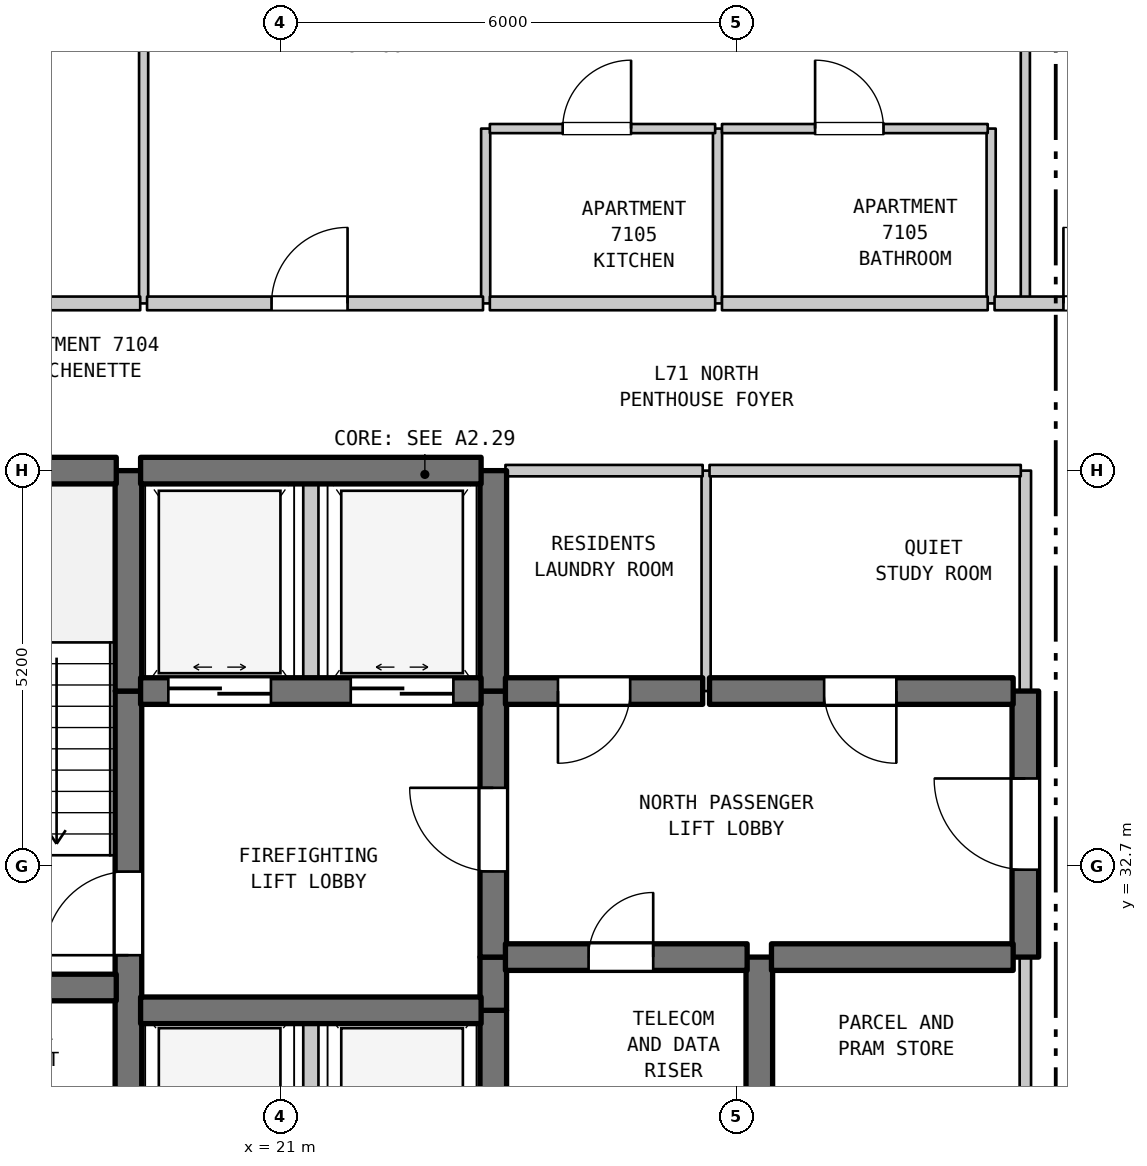
"""IFC4 building model, lengths in metres.
Left out: names, types, materials, properties, quantities, classifications, styles, units other than length and angle.
Written with IfcOpenShell. Run it as: python <this file> out.ifc"""

import sys

from ifc_helpers import new_model, si_unit, direction, frame, frame_2d, origin, place, context, subcontext, project, spatial, rectangle, extrude, element, fill, save


model = new_model("IFC4")
c1 = context("Model", 3, precision=1e-05, world=origin(), true_north=direction((0.0, 1.0)))
c2 = subcontext(c1, "Body", "Model", "MODEL_VIEW")
j1 = project(units=[si_unit("LENGTHUNIT", "METRE"), si_unit("PLANEANGLEUNIT", "RADIAN")], contexts=[c1])
p1 = place(None, origin())
s1 = spatial("IfcSite", under=j1, at=p1, CompositionType="ELEMENT")
p2 = place(p1, origin())
s2 = spatial("IfcBuilding", under=s1, at=p2, CompositionType="ELEMENT")
p3 = place(p2, frame((0.0, 0.0, 284.3)))
s3 = spatial("IfcBuildingStorey", under=s2, at=p3, CompositionType="ELEMENT", Elevation=284.3)
p4 = place(p3, frame((19.0, 29.5, 0.0), z_axis=(0.0, 0.0, 1.0), x_axis=(0.0, 1.0, 0.0)))
e1 = element("IfcWall", 1, at=p4, inside=s3, PredefinedType="SHEAR", context=c2, shape_type="SweptSolid", body=[
    extrude(rectangle(XDim=5.5, YDim=0.35, at=frame_2d((2.75, 0.0))), origin(), (0.0, 0.0, 1.0), 3.39),
])
p5 = place(p4, frame((2.025, 0.0, 0.0)))
e2 = element("IfcOpeningElement", 2, at=p5, cuts=e1, PredefinedType="OPENING", context=c2, shape_type="SweptSolid", body=[
    extrude(rectangle(XDim=1.1, YDim=2.15, at=frame_2d((0.55, 1.075))), frame((0.0, 0.185, 0.0), z_axis=(0.0, -1.0, 0.0), x_axis=(1.0, 0.0, 0.0)), (0.0, 0.0, 1.0), 0.37),
])
p6 = place(p3, frame((19.0, 35.0, 0.0), z_axis=(0.0, 0.0, 1.0), x_axis=(0.0, 1.0, 0.0)))
e3 = element("IfcWall", 3, at=p6, inside=s3, PredefinedType="SHEAR", context=c2, shape_type="SweptSolid", body=[
    extrude(rectangle(XDim=2.9, YDim=0.35, at=frame_2d((1.45, 0.0))), origin(), (0.0, 0.0, 1.0), 3.39),
])
p7 = place(p3, frame((19.2, 40.1, 0.0), z_axis=(0.0, 0.0, 1.0), x_axis=(0.0, 1.0, 0.0)))
e4 = element("IfcWall", 4, at=p7, inside=s3, PredefinedType="PARTITIONING", context=c2, shape_type="SweptSolid", body=[
    extrude(rectangle(XDim=13.79, YDim=0.12, at=frame_2d((6.895, 0.0))), origin(), (0.0, 0.0, 1.0), 3.39),
])
p8 = place(p3, frame((21.4, 28.2, 0.0), z_axis=(0.0, 0.0, 1.0), x_axis=(0.0, 1.0, 0.0)))
e5 = element("IfcWall", 5, at=p8, inside=s3, PredefinedType="STANDARD", context=c2, shape_type="SweptSolid", body=[
    extrude(rectangle(XDim=2.6, YDim=0.2, at=frame_2d((1.3, 0.0))), origin(), (0.0, 0.0, 1.0), 3.39),
])
p9 = place(p3, frame((21.4, 35.0, 0.0), z_axis=(0.0, 0.0, 1.0), x_axis=(0.0, 1.0, 0.0)))
e6 = element("IfcWall", 6, at=p9, inside=s3, PredefinedType="STANDARD", context=c2, shape_type="SweptSolid", body=[
    extrude(rectangle(XDim=2.9, YDim=0.2, at=frame_2d((1.45, 0.0))), origin(), (0.0, 0.0, 1.0), 3.39),
])
p10 = place(p3, frame((23.7, 40.1, 0.0), z_axis=(0.0, 0.0, 1.0), x_axis=(0.0, 1.0, 0.0)))
e7 = element("IfcWall", 7, at=p10, inside=s3, PredefinedType="PARTITIONING", context=c2, shape_type="SweptSolid", body=[
    extrude(rectangle(XDim=2.3, YDim=0.12, at=frame_2d((1.15, 0.0))), origin(), (0.0, 0.0, 1.0), 3.39),
])
p11 = place(p3, frame((23.8, 28.2, 0.0), z_axis=(0.0, 0.0, 1.0), x_axis=(0.0, 1.0, 0.0)))
e8 = element("IfcWall", 8, at=p11, inside=s3, PredefinedType="SHEAR", context=c2, shape_type="SweptSolid", body=[
    extrude(rectangle(XDim=2.6, YDim=0.35, at=frame_2d((1.3, 0.0))), origin(), (0.0, 0.0, 1.0), 3.39),
])
p12 = place(p3, frame((23.8, 30.8, 0.0), z_axis=(0.0, 0.0, 1.0), x_axis=(0.0, 1.0, 0.0)))
e9 = element("IfcWall", 9, at=p12, inside=s3, PredefinedType="SHEAR", context=c2, shape_type="SweptSolid", body=[
    extrude(rectangle(XDim=0.7, YDim=0.35, at=frame_2d((0.35, 0.0))), origin(), (0.0, 0.0, 1.0), 3.39),
])
p13 = place(p3, frame((23.8, 31.5, 0.0), z_axis=(0.0, 0.0, 1.0), x_axis=(0.0, 1.0, 0.0)))
e10 = element("IfcWall", 10, at=p13, inside=s3, PredefinedType="SHEAR", context=c2, shape_type="SweptSolid", body=[
    extrude(rectangle(XDim=3.5, YDim=0.35, at=frame_2d((1.75, 0.0))), origin(), (0.0, 0.0, 1.0), 3.39),
])
p14 = place(p13, frame((1.127, 0.0, 0.0)))
e11 = element("IfcOpeningElement", 11, at=p14, cuts=e10, PredefinedType="OPENING", context=c2, shape_type="SweptSolid", body=[
    extrude(rectangle(XDim=1.1, YDim=2.15, at=frame_2d((0.55, 1.075))), frame((0.0, 0.185, 0.0), z_axis=(0.0, -1.0, 0.0), x_axis=(1.0, 0.0, 0.0)), (0.0, 0.0, 1.0), 0.37),
])
p15 = place(p3, frame((23.8, 35.0, 0.0), z_axis=(0.0, 0.0, 1.0), x_axis=(0.0, 1.0, 0.0)))
e12 = element("IfcWall", 12, at=p15, inside=s3, PredefinedType="SHEAR", context=c2, shape_type="SweptSolid", body=[
    extrude(rectangle(XDim=2.9, YDim=0.35, at=frame_2d((1.45, 0.0))), origin(), (0.0, 0.0, 1.0), 3.39),
])
p16 = place(p3, frame((26.6, 35.0, 0.0), z_axis=(0.0, 0.0, 1.0), x_axis=(0.0, 1.0, 0.0)))
e13 = element("IfcWall", 13, at=p16, inside=s3, PredefinedType="PARTITIONING", context=c2, shape_type="SweptSolid", body=[
    extrude(rectangle(XDim=2.9, YDim=0.12, at=frame_2d((1.45, 0.0))), origin(), (0.0, 0.0, 1.0), 3.39),
])
p17 = place(p3, frame((26.75, 40.1, 0.0), z_axis=(0.0, 0.0, 1.0), x_axis=(0.0, 1.0, 0.0)))
e14 = element("IfcWall", 14, at=p17, inside=s3, PredefinedType="PARTITIONING", context=c2, shape_type="SweptSolid", body=[
    extrude(rectangle(XDim=2.3, YDim=0.12, at=frame_2d((1.15, 0.0))), origin(), (0.0, 0.0, 1.0), 3.39),
])
p18 = place(p3, frame((27.3, 28.9, 0.0), z_axis=(0.0, 0.0, 1.0), x_axis=(0.0, 1.0, 0.0)))
e15 = element("IfcWall", 15, at=p18, inside=s3, PredefinedType="SHEAR", context=c2, shape_type="SweptSolid", body=[
    extrude(rectangle(XDim=2.6, YDim=0.35, at=frame_2d((1.3, 0.0))), origin(), (0.0, 0.0, 1.0), 3.39),
])
p19 = place(p3, frame((30.35, 40.1, 0.0), z_axis=(0.0, 0.0, 1.0), x_axis=(0.0, 1.0, 0.0)))
e16 = element("IfcWall", 16, at=p19, inside=s3, PredefinedType="PARTITIONING", context=c2, shape_type="SweptSolid", body=[
    extrude(rectangle(XDim=2.3, YDim=0.12, at=frame_2d((1.15, 0.0))), origin(), (0.0, 0.0, 1.0), 3.39),
])
p20 = place(p3, frame((30.8, 28.9, 0.0), z_axis=(0.0, 0.0, 1.0), x_axis=(0.0, 1.0, 0.0)))
e17 = element("IfcWall", 17, at=p20, inside=s3, PredefinedType="STANDARD", context=c2, shape_type="SweptSolid", body=[
    extrude(rectangle(XDim=2.6, YDim=0.15, at=frame_2d((1.3, 0.0))), origin(), (0.0, 0.0, 1.0), 3.39),
])
p21 = place(p3, frame((30.8, 31.5, 0.0), z_axis=(0.0, 0.0, 1.0), x_axis=(0.0, 1.0, 0.0)))
e18 = element("IfcWall", 18, at=p21, inside=s3, PredefinedType="SHEAR", context=c2, shape_type="SweptSolid", body=[
    extrude(rectangle(XDim=3.5, YDim=0.35, at=frame_2d((1.75, 0.0))), origin(), (0.0, 0.0, 1.0), 3.39),
])
p22 = place(p21, frame((1.15, 0.0, 0.0)))
e19 = element("IfcOpeningElement", 19, at=p22, cuts=e18, PredefinedType="OPENING", context=c2, shape_type="SweptSolid", body=[
    extrude(rectangle(XDim=1.2, YDim=2.2, at=frame_2d((0.6, 1.1))), frame((0.0, 0.185, 0.0), z_axis=(0.0, -1.0, 0.0), x_axis=(1.0, 0.0, 0.0)), (0.0, 0.0, 1.0), 0.37),
])
p23 = place(p3, frame((30.8, 35.0, 0.0), z_axis=(0.0, 0.0, 1.0), x_axis=(0.0, 1.0, 0.0)))
e20 = element("IfcWall", 20, at=p23, inside=s3, PredefinedType="STANDARD", context=c2, shape_type="SweptSolid", body=[
    extrude(rectangle(XDim=2.9, YDim=0.15, at=frame_2d((1.45, 0.0))), origin(), (0.0, 0.0, 1.0), 3.39),
])
p24 = place(p3, frame((30.8, 40.1, 0.0), z_axis=(0.0, 0.0, 1.0), x_axis=(0.0, 1.0, 0.0)))
e21 = element("IfcWall", 21, at=p24, inside=s3, PredefinedType="PARTITIONING", context=c2, shape_type="SweptSolid", body=[
    extrude(rectangle(XDim=13.79, YDim=0.12, at=frame_2d((6.895, 0.0))), origin(), (0.0, 0.0, 1.0), 3.39),
])
p25 = place(p3, frame((19.16, 30.8, 0.0), z_axis=(0.0, 0.0, 1.0), x_axis=(1.0, 0.0, 0.0)))
e22 = element("IfcWall", 22, at=p25, inside=s3, PredefinedType="SHEAR", context=c2, shape_type="SweptSolid", body=[
    extrude(rectangle(XDim=4.48, YDim=0.35, at=frame_2d((2.24, 0.0))), origin(), (0.0, 0.0, 1.0), 3.39),
])
p26 = place(p3, frame((15.16, 31.1, 0.0), z_axis=(0.0, 0.0, 1.0), x_axis=(1.0, 0.0, 0.0)))
e23 = element("IfcWall", 23, at=p26, inside=s3, PredefinedType="SHEAR", context=c2, shape_type="SweptSolid", body=[
    extrude(rectangle(XDim=3.68, YDim=0.35, at=frame_2d((1.84, 0.0))), origin(), (0.0, 0.0, 1.0), 3.39),
])
p27 = place(p3, frame((23.96, 31.5, 0.0), z_axis=(0.0, 0.0, 1.0), x_axis=(1.0, 0.0, 0.0)))
e24 = element("IfcWall", 24, at=p27, inside=s3, PredefinedType="SHEAR", context=c2, shape_type="SweptSolid", body=[
    extrude(rectangle(XDim=3.18, YDim=0.35, at=frame_2d((1.59, 0.0))), origin(), (0.0, 0.0, 1.0), 3.39),
])
p28 = place(p27, frame((1.094, 0.0, 0.0)))
e25 = element("IfcOpeningElement", 25, at=p28, cuts=e24, PredefinedType="OPENING", context=c2, shape_type="SweptSolid", body=[
    extrude(rectangle(XDim=0.85, YDim=2.1, at=frame_2d((0.425, 1.05))), frame((0.0, 0.185, 0.0), z_axis=(0.0, -1.0, 0.0), x_axis=(1.0, 0.0, 0.0)), (0.0, 0.0, 1.0), 0.37),
])
p29 = place(p3, frame((27.46, 31.5, 0.0), z_axis=(0.0, 0.0, 1.0), x_axis=(1.0, 0.0, 0.0)))
e26 = element("IfcWall", 26, at=p29, inside=s3, PredefinedType="SHEAR", context=c2, shape_type="SweptSolid", body=[
    extrude(rectangle(XDim=3.18, YDim=0.35, at=frame_2d((1.59, 0.0))), origin(), (0.0, 0.0, 1.0), 3.39),
])
p30 = place(p3, frame((19.16, 35.0, 0.0), z_axis=(0.0, 0.0, 1.0), x_axis=(1.0, 0.0, 0.0)))
e27 = element("IfcWall", 27, at=p30, inside=s3, PredefinedType="SHEAR", context=c2, shape_type="SweptSolid", body=[
    extrude(rectangle(XDim=4.48, YDim=0.35, at=frame_2d((2.24, 0.0))), origin(), (0.0, 0.0, 1.0), 3.39),
])
p31 = place(p30, frame((0.365, 0.0, 0.0)))
e28 = element("IfcOpeningElement", 28, at=p31, cuts=e27, PredefinedType="OPENING", context=c2, shape_type="SweptSolid", body=[
    extrude(rectangle(XDim=1.35, YDim=2.2, at=frame_2d((0.675, 1.1))), frame((0.0, 0.185, 0.0), z_axis=(0.0, -1.0, 0.0), x_axis=(1.0, 0.0, 0.0)), (0.0, 0.0, 1.0), 0.37),
])
p32 = place(p30, frame((2.765, 0.0, 0.0)))
e29 = element("IfcOpeningElement", 29, at=p32, cuts=e27, PredefinedType="OPENING", context=c2, shape_type="SweptSolid", body=[
    extrude(rectangle(XDim=1.35, YDim=2.2, at=frame_2d((0.675, 1.1))), frame((0.0, 0.185, 0.0), z_axis=(0.0, -1.0, 0.0), x_axis=(1.0, 0.0, 0.0)), (0.0, 0.0, 1.0), 0.37),
])
p33 = place(p3, frame((23.96, 35.0, 0.0), z_axis=(0.0, 0.0, 1.0), x_axis=(1.0, 0.0, 0.0)))
e30 = element("IfcWall", 30, at=p33, inside=s3, PredefinedType="SHEAR", context=c2, shape_type="SweptSolid", body=[
    extrude(rectangle(XDim=2.595, YDim=0.35, at=frame_2d((1.297, 0.0))), origin(), (0.0, 0.0, 1.0), 3.39),
])
p34 = place(p33, frame((0.691, 0.0, 0.0)))
e31 = element("IfcOpeningElement", 31, at=p34, cuts=e30, PredefinedType="OPENING", context=c2, shape_type="SweptSolid", body=[
    extrude(rectangle(XDim=0.95, YDim=2.15, at=frame_2d((0.475, 1.075))), frame((0.0, 0.185, 0.0), z_axis=(0.0, -1.0, 0.0), x_axis=(1.0, 0.0, 0.0)), (0.0, 0.0, 1.0), 0.37),
])
p35 = place(p3, frame((26.645, 35.0, 0.0), z_axis=(0.0, 0.0, 1.0), x_axis=(1.0, 0.0, 0.0)))
e32 = element("IfcWall", 32, at=p35, inside=s3, PredefinedType="SHEAR", context=c2, shape_type="SweptSolid", body=[
    extrude(rectangle(XDim=3.995, YDim=0.35, at=frame_2d((1.998, 0.0))), origin(), (0.0, 0.0, 1.0), 3.39),
])
p36 = place(p35, frame((1.508, 0.0, 0.0)))
e33 = element("IfcOpeningElement", 33, at=p36, cuts=e32, PredefinedType="OPENING", context=c2, shape_type="SweptSolid", body=[
    extrude(rectangle(XDim=0.95, YDim=2.15, at=frame_2d((0.475, 1.075))), frame((0.0, 0.185, 0.0), z_axis=(0.0, -1.0, 0.0), x_axis=(1.0, 0.0, 0.0)), (0.0, 0.0, 1.0), 0.37),
])
p37 = place(p3, frame((15.16, 37.9, 0.0), z_axis=(0.0, 0.0, 1.0), x_axis=(1.0, 0.0, 0.0)))
e34 = element("IfcWall", 34, at=p37, inside=s3, PredefinedType="SHEAR", context=c2, shape_type="SweptSolid", body=[
    extrude(rectangle(XDim=3.68, YDim=0.35, at=frame_2d((1.84, 0.0))), origin(), (0.0, 0.0, 1.0), 3.39),
])
p38 = place(p3, frame((19.16, 37.9, 0.0), z_axis=(0.0, 0.0, 1.0), x_axis=(1.0, 0.0, 0.0)))
e35 = element("IfcWall", 35, at=p38, inside=s3, PredefinedType="SHEAR", context=c2, shape_type="SweptSolid", body=[
    extrude(rectangle(XDim=4.48, YDim=0.35, at=frame_2d((2.24, 0.0))), origin(), (0.0, 0.0, 1.0), 3.39),
])
p39 = place(p3, frame((23.96, 37.9, 0.0), z_axis=(0.0, 0.0, 1.0), x_axis=(1.0, 0.0, 0.0)))
e36 = element("IfcWall", 36, at=p39, inside=s3, PredefinedType="STANDARD", context=c2, shape_type="SweptSolid", body=[
    extrude(rectangle(XDim=2.595, YDim=0.15, at=frame_2d((1.297, 0.0))), origin(), (0.0, 0.0, 1.0), 2.89),
])
p40 = place(p3, frame((26.645, 37.9, 0.0), z_axis=(0.0, 0.0, 1.0), x_axis=(1.0, 0.0, 0.0)))
e37 = element("IfcWall", 37, at=p40, inside=s3, PredefinedType="STANDARD", context=c2, shape_type="SweptSolid", body=[
    extrude(rectangle(XDim=4.095, YDim=0.15, at=frame_2d((2.047, 0.0))), origin(), (0.0, 0.0, 1.0), 2.89),
])
p41 = place(p3, frame((17.295, 40.1, 0.0), z_axis=(0.0, 0.0, 1.0), x_axis=(1.0, 0.0, 0.0)))
e38 = element("IfcWall", 38, at=p41, inside=s3, PredefinedType="STANDARD", context=c2, shape_type="SweptSolid", body=[
    extrude(rectangle(XDim=1.86, YDim=0.18, at=frame_2d((0.93, 0.0))), origin(), (0.0, 0.0, 1.0), 3.39),
])
p42 = place(p3, frame((19.245, 40.1, 0.0), z_axis=(0.0, 0.0, 1.0), x_axis=(1.0, 0.0, 0.0)))
e39 = element("IfcWall", 39, at=p42, inside=s3, PredefinedType="STANDARD", context=c2, shape_type="SweptSolid", body=[
    extrude(rectangle(XDim=4.42, YDim=0.18, at=frame_2d((2.21, 0.0))), origin(), (0.0, 0.0, 1.0), 3.39),
])
p43 = place(p42, frame((1.638, 0.0, 0.0)))
e40 = element("IfcOpeningElement", 40, at=p43, cuts=e39, PredefinedType="OPENING", context=c2, shape_type="SweptSolid", body=[
    extrude(rectangle(XDim=1.0, YDim=2.15, at=frame_2d((0.5, 1.075))), frame((0.0, 0.1, 0.0), z_axis=(0.0, -1.0, 0.0), x_axis=(1.0, 0.0, 0.0)), (0.0, 0.0, 1.0), 0.2),
])
p44 = place(p3, frame((23.755, 40.1, 0.0), z_axis=(0.0, 0.0, 1.0), x_axis=(1.0, 0.0, 0.0)))
e41 = element("IfcWall", 41, at=p44, inside=s3, PredefinedType="STANDARD", context=c2, shape_type="SweptSolid", body=[
    extrude(rectangle(XDim=2.964, YDim=0.18, at=frame_2d((1.482, 0.0))), origin(), (0.0, 0.0, 1.0), 3.39),
])
p45 = place(p3, frame((26.809, 40.1, 0.0), z_axis=(0.0, 0.0, 1.0), x_axis=(1.0, 0.0, 0.0)))
e42 = element("IfcWall", 42, at=p45, inside=s3, PredefinedType="STANDARD", context=c2, shape_type="SweptSolid", body=[
    extrude(rectangle(XDim=3.496, YDim=0.18, at=frame_2d((1.748, 0.0))), origin(), (0.0, 0.0, 1.0), 3.39),
])
p46 = place(p3, frame((30.395, 40.1, 0.0), z_axis=(0.0, 0.0, 1.0), x_axis=(1.0, 0.0, 0.0)))
e43 = element("IfcWall", 43, at=p46, inside=s3, PredefinedType="STANDARD", context=c2, shape_type="SweptSolid", body=[
    extrude(rectangle(XDim=2.545, YDim=0.18, at=frame_2d((1.272, 0.0))), origin(), (0.0, 0.0, 1.0), 3.39),
])
p47 = place(p46, frame((0.906, 0.0, 0.0)))
e44 = element("IfcOpeningElement", 44, at=p47, cuts=e43, PredefinedType="OPENING", context=c2, shape_type="SweptSolid", body=[
    extrude(rectangle(XDim=1.0, YDim=2.15, at=frame_2d((0.5, 1.075))), frame((0.0, 0.1, 0.0), z_axis=(0.0, -1.0, 0.0), x_axis=(1.0, 0.0, 0.0)), (0.0, 0.0, 1.0), 0.2),
])
p48 = place(p3, frame((23.755, 42.4, 0.0), z_axis=(0.0, 0.0, 1.0), x_axis=(1.0, 0.0, 0.0)))
e45 = element("IfcWall", 45, at=p48, inside=s3, PredefinedType="PARTITIONING", context=c2, shape_type="SweptSolid", body=[
    extrude(rectangle(XDim=2.964, YDim=0.12, at=frame_2d((1.482, 0.0))), origin(), (0.0, 0.0, 1.0), 3.39),
])
p49 = place(p48, frame((0.958, 0.0, 0.0)))
e46 = element("IfcOpeningElement", 46, at=p49, cuts=e45, PredefinedType="OPENING", context=c2, shape_type="SweptSolid", body=[
    extrude(rectangle(XDim=0.9, YDim=2.15, at=frame_2d((0.45, 1.075))), frame((0.0, 0.07, 0.0), z_axis=(0.0, -1.0, 0.0), x_axis=(1.0, 0.0, 0.0)), (0.0, 0.0, 1.0), 0.14),
])
p50 = place(p3, frame((26.809, 42.4, 0.0), z_axis=(0.0, 0.0, 1.0), x_axis=(1.0, 0.0, 0.0)))
e47 = element("IfcWall", 47, at=p50, inside=s3, PredefinedType="PARTITIONING", context=c2, shape_type="SweptSolid", body=[
    extrude(rectangle(XDim=3.496, YDim=0.12, at=frame_2d((1.748, 0.0))), origin(), (0.0, 0.0, 1.0), 3.39),
])
p51 = place(p50, frame((1.225, 0.0, 0.0)))
e48 = element("IfcOpeningElement", 48, at=p51, cuts=e47, PredefinedType="OPENING", context=c2, shape_type="SweptSolid", body=[
    extrude(rectangle(XDim=0.9, YDim=2.1, at=frame_2d((0.45, 1.05))), frame((0.0, 0.07, 0.0), z_axis=(0.0, -1.0, 0.0), x_axis=(1.0, 0.0, 0.0)), (0.0, 0.0, 1.0), 0.14),
])
p52 = place(p5, origin())
e49 = element("IfcDoor", 49, at=p52, inside=s3, OperationType="SINGLE_SWING_LEFT", PredefinedType="DOOR", context=c2, shape_type="SweptSolid", body=[
    extrude(rectangle(XDim=1.1, YDim=2.15, at=frame_2d((0.55, 1.075))), frame((0.0, 0.025, 0.0), z_axis=(0.0, -1.0, 0.0), x_axis=(1.0, 0.0, 0.0)), (0.0, 0.0, 1.0), 0.05),
])
fill(e2, e49)
p53 = place(p14, origin())
e50 = element("IfcDoor", 50, at=p53, inside=s3, OperationType="SINGLE_SWING_RIGHT", PredefinedType="DOOR", context=c2, shape_type="SweptSolid", body=[
    extrude(rectangle(XDim=1.1, YDim=2.15, at=frame_2d((0.55, 1.075))), frame((0.0, 0.025, 0.0), z_axis=(0.0, -1.0, 0.0), x_axis=(1.0, 0.0, 0.0)), (0.0, 0.0, 1.0), 0.05),
])
fill(e11, e50)
p54 = place(p22, origin())
e51 = element("IfcDoor", 51, at=p54, inside=s3, OperationType="SINGLE_SWING_RIGHT", PredefinedType="DOOR", context=c2, shape_type="SweptSolid", body=[
    extrude(rectangle(XDim=1.2, YDim=2.2, at=frame_2d((0.6, 1.1))), frame((0.0, 0.025, 0.0), z_axis=(0.0, -1.0, 0.0), x_axis=(1.0, 0.0, 0.0)), (0.0, 0.0, 1.0), 0.05),
])
fill(e19, e51)
p55 = place(p28, origin())
e52 = element("IfcDoor", 52, at=p55, inside=s3, OperationType="SINGLE_SWING_RIGHT", PredefinedType="DOOR", context=c2, shape_type="SweptSolid", body=[
    extrude(rectangle(XDim=0.85, YDim=2.1, at=frame_2d((0.425, 1.05))), frame((0.0, 0.025, 0.0), z_axis=(0.0, -1.0, 0.0), x_axis=(1.0, 0.0, 0.0)), (0.0, 0.0, 1.0), 0.05),
])
fill(e25, e52)
p56 = place(p31, origin())
e53 = element("IfcDoor", 53, at=p56, inside=s3, OperationType="DOUBLE_DOOR_SLIDING", PredefinedType="DOOR", context=c2, shape_type="SweptSolid", body=[
    extrude(rectangle(XDim=1.35, YDim=2.2, at=frame_2d((0.675, 1.1))), frame((0.0, 0.025, 0.0), z_axis=(0.0, -1.0, 0.0), x_axis=(1.0, 0.0, 0.0)), (0.0, 0.0, 1.0), 0.05),
])
fill(e28, e53)
p57 = place(p32, origin())
e54 = element("IfcDoor", 54, at=p57, inside=s3, OperationType="DOUBLE_DOOR_SLIDING", PredefinedType="DOOR", context=c2, shape_type="SweptSolid", body=[
    extrude(rectangle(XDim=1.35, YDim=2.2, at=frame_2d((0.675, 1.1))), frame((0.0, 0.025, 0.0), z_axis=(0.0, -1.0, 0.0), x_axis=(1.0, 0.0, 0.0)), (0.0, 0.0, 1.0), 0.05),
])
fill(e29, e54)
p58 = place(p34, frame((0.95, 0.0, 0.0), z_axis=(0.0, 0.0, 1.0), x_axis=(-1.0, 0.0, 0.0)))
e55 = element("IfcDoor", 55, at=p58, inside=s3, OperationType="SINGLE_SWING_LEFT", PredefinedType="DOOR", context=c2, shape_type="SweptSolid", body=[
    extrude(rectangle(XDim=0.95, YDim=2.15, at=frame_2d((0.475, 1.075))), frame((0.0, 0.025, 0.0), z_axis=(0.0, -1.0, 0.0), x_axis=(1.0, 0.0, 0.0)), (0.0, 0.0, 1.0), 0.05),
])
fill(e31, e55)
p59 = place(p36, frame((0.95, 0.0, 0.0), z_axis=(0.0, 0.0, 1.0), x_axis=(-1.0, 0.0, 0.0)))
e56 = element("IfcDoor", 56, at=p59, inside=s3, OperationType="SINGLE_SWING_RIGHT", PredefinedType="DOOR", context=c2, shape_type="SweptSolid", body=[
    extrude(rectangle(XDim=0.95, YDim=2.15, at=frame_2d((0.475, 1.075))), frame((0.0, 0.025, 0.0), z_axis=(0.0, -1.0, 0.0), x_axis=(1.0, 0.0, 0.0)), (0.0, 0.0, 1.0), 0.05),
])
fill(e33, e56)
p60 = place(p43, origin())
e57 = element("IfcDoor", 57, at=p60, inside=s3, OperationType="SINGLE_SWING_RIGHT", PredefinedType="DOOR", context=c2, shape_type="SweptSolid", body=[
    extrude(rectangle(XDim=1.0, YDim=2.15, at=frame_2d((0.5, 1.075))), frame((0.0, 0.025, 0.0), z_axis=(0.0, -1.0, 0.0), x_axis=(1.0, 0.0, 0.0)), (0.0, 0.0, 1.0), 0.05),
])
fill(e40, e57)
p61 = place(p47, origin())
e58 = element("IfcDoor", 58, at=p61, inside=s3, OperationType="SINGLE_SWING_LEFT", PredefinedType="DOOR", context=c2, shape_type="SweptSolid", body=[
    extrude(rectangle(XDim=1.0, YDim=2.15, at=frame_2d((0.5, 1.075))), frame((0.0, 0.025, 0.0), z_axis=(0.0, -1.0, 0.0), x_axis=(1.0, 0.0, 0.0)), (0.0, 0.0, 1.0), 0.05),
])
fill(e44, e58)
p62 = place(p49, origin())
e59 = element("IfcDoor", 59, at=p62, inside=s3, OperationType="SINGLE_SWING_RIGHT", PredefinedType="DOOR", context=c2, shape_type="SweptSolid", body=[
    extrude(rectangle(XDim=0.9, YDim=2.15, at=frame_2d((0.45, 1.075))), frame((0.0, 0.025, 0.0), z_axis=(0.0, -1.0, 0.0), x_axis=(1.0, 0.0, 0.0)), (0.0, 0.0, 1.0), 0.05),
])
fill(e46, e59)
p63 = place(p51, origin())
e60 = element("IfcDoor", 60, at=p63, inside=s3, OperationType="SINGLE_SWING_LEFT", PredefinedType="DOOR", context=c2, shape_type="SweptSolid", body=[
    extrude(rectangle(XDim=0.9, YDim=2.1, at=frame_2d((0.45, 1.05))), frame((0.0, 0.025, 0.0), z_axis=(0.0, -1.0, 0.0), x_axis=(1.0, 0.0, 0.0)), (0.0, 0.0, 1.0), 0.05),
])
fill(e48, e60)
save(model, sys.argv[1])
